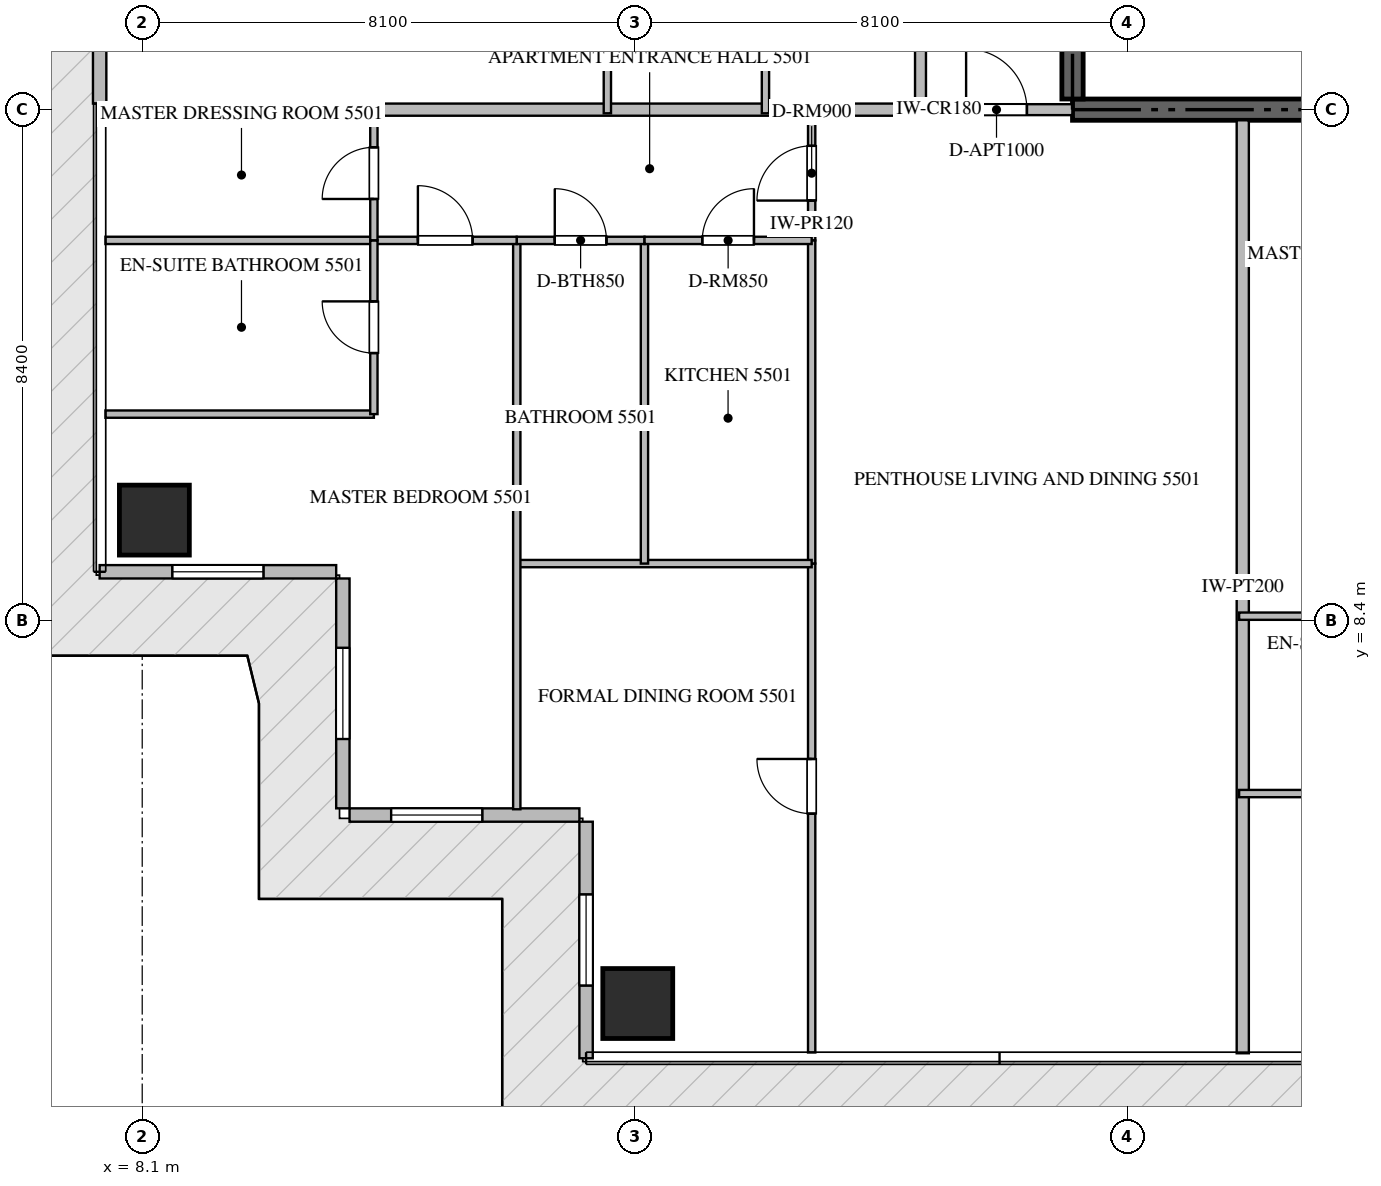
"""IFC4 building model, lengths in metres.
Left out: names, types, materials, properties, quantities, classifications, styles, units other than length and angle.
Written with IfcOpenShell. Run it as: python <this file> out.ifc"""

import sys

from ifc_helpers import new_model, si_unit, direction, frame, frame_2d, origin, origin_2d, place, context, subcontext, project, spatial, rectangle, extrude, source, transform, mapped, element, fill, save


model = new_model("IFC4")
c1 = context("Model", 3, precision=1e-05, world=origin(), true_north=direction((0.0, 1.0)))
c2 = subcontext(c1, "Body", "Model", "MODEL_VIEW")
j1 = project(units=[si_unit("LENGTHUNIT", "METRE"), si_unit("PLANEANGLEUNIT", "RADIAN")], contexts=[c1])
p1 = place(None, origin())
s1 = spatial("IfcSite", under=j1, at=p1, CompositionType="ELEMENT")
p2 = place(p1, origin())
s2 = spatial("IfcBuilding", under=s1, at=p2, CompositionType="ELEMENT")
p3 = place(p2, frame((0.0, 0.0, 222.0)))
s3 = spatial("IfcBuildingStorey", under=s2, at=p3, CompositionType="ELEMENT", Elevation=222.0)
p4 = place(p3, frame((23.4, 16.8, -0.26), z_axis=(0.0, 0.0, 1.0), x_axis=(1.0, 0.0, 0.0)))
e1 = element("IfcWall", 1, at=p4, inside=s3, PredefinedType="SHEAR", context=c2, shape_type="SweptSolid", body=[
    extrude(rectangle(XDim=18.0, YDim=0.35, at=frame_2d((9.0, 0.0))), origin(), (0.0, 0.0, 1.0), 3.848),
])
p5 = place(p3, frame((23.4, 16.975, -0.26), z_axis=(0.0, 0.0, 1.0), x_axis=(0.0, 1.0, 0.0)))
e2 = element("IfcWall", 2, at=p5, inside=s3, PredefinedType="SHEAR", context=c2, shape_type="SweptSolid", body=[
    extrude(rectangle(XDim=4.875, YDim=0.35, at=frame_2d((2.438, 0.0))), origin(), (0.0, 0.0, 1.0), 3.848),
])
m1 = source(origin(), c2, "Body", "SweptSolid", [
    extrude(rectangle(XDim=1.15, YDim=1.15, at=origin_2d()), origin(), (0.0, 0.0, 1.0), 3.85),
])
for number, where, z_axis, x_axis in (
    (3, (16.25, 2.1, -0.26), (0.0, 0.0, 1.0), (1.0, 0.0, 0.0)),
    (4, (8.3, 10.05, -0.26), (0.0, 0.0, 1.0), (1.0, 0.0, 0.0)),
):
    element("IfcColumn", number, at=place(p3, frame(where, z_axis=z_axis, x_axis=x_axis)), inside=s3, PredefinedType="COLUMN", context=c2, shape_type="MappedRepresentation", body=[
        mapped(m1, transform((0.0, 0.0, 0.0), scale=1.0)),
    ])
p6 = place(p3, frame((7.4, 19.9, 0.0), z_axis=(0.0, 0.0, 1.0), x_axis=(0.0, -1.0, 0.0)))
e5 = element("IfcWall", 5, at=p6, inside=s3, PredefinedType="ELEMENTEDWALL", context=c2, shape_type="SweptSolid", body=[
    extrude(rectangle(XDim=3.0, YDim=0.22, at=frame_2d((1.5, 0.0))), origin(), (0.0, 0.0, 1.0), 3.575),
])
p7 = place(p6, frame((0.95, 0.0, 0.0)))
e6 = element("IfcOpeningElement", 6, at=p7, cuts=e5, PredefinedType="OPENING", context=c2, shape_type="SweptSolid", body=[
    extrude(rectangle(XDim=1.1, YDim=2.2, at=frame_2d((0.55, 1.1))), frame((0.0, 0.12, 0.0), z_axis=(0.0, -1.0, 0.0), x_axis=(1.0, 0.0, 0.0)), (0.0, 0.0, 1.0), 0.24),
])
p8 = place(p3, frame((7.4, 9.2, 0.0), z_axis=(0.0, 0.0, 1.0), x_axis=(1.0, 0.0, 0.0)))
e7 = element("IfcWall", 7, at=p8, inside=s3, PredefinedType="ELEMENTEDWALL", context=c2, shape_type="SweptSolid", body=[
    extrude(rectangle(XDim=3.89, YDim=0.22, at=frame_2d((1.945, 0.0))), origin(), (0.0, 0.0, 1.0), 3.575),
])
p9 = place(p8, frame((1.195, 0.0, 0.65)))
e8 = element("IfcOpeningElement", 8, at=p9, cuts=e7, PredefinedType="OPENING", context=c2, shape_type="SweptSolid", body=[
    extrude(rectangle(XDim=1.5, YDim=2.25, at=frame_2d((0.75, 1.125))), frame((0.0, 0.12, 0.0), z_axis=(0.0, -1.0, 0.0), x_axis=(1.0, 0.0, 0.0)), (0.0, 0.0, 1.0), 0.24),
])
p10 = place(p3, frame((11.4, 9.09, 0.0), z_axis=(0.0, 0.0, 1.0), x_axis=(0.0, -1.0, 0.0)))
e9 = element("IfcWall", 9, at=p10, inside=s3, PredefinedType="ELEMENTEDWALL", context=c2, shape_type="SweptSolid", body=[
    extrude(rectangle(XDim=3.78, YDim=0.22, at=frame_2d((1.89, 0.0))), origin(), (0.0, 0.0, 1.0), 3.575),
])
p11 = place(p10, frame((1.14, 0.0, 0.65)))
e10 = element("IfcOpeningElement", 10, at=p11, cuts=e9, PredefinedType="OPENING", context=c2, shape_type="SweptSolid", body=[
    extrude(rectangle(XDim=1.5, YDim=2.25, at=frame_2d((0.75, 1.125))), frame((0.0, 0.12, 0.0), z_axis=(0.0, -1.0, 0.0), x_axis=(1.0, 0.0, 0.0)), (0.0, 0.0, 1.0), 0.24),
])
p12 = place(p3, frame((11.51, 5.2, 0.0), z_axis=(0.0, 0.0, 1.0), x_axis=(1.0, 0.0, 0.0)))
e11 = element("IfcWall", 11, at=p12, inside=s3, PredefinedType="ELEMENTEDWALL", context=c2, shape_type="SweptSolid", body=[
    extrude(rectangle(XDim=3.78, YDim=0.22, at=frame_2d((1.89, 0.0))), origin(), (0.0, 0.0, 1.0), 3.575),
])
p13 = place(p12, frame((0.684, 0.0, 0.65)))
e12 = element("IfcOpeningElement", 12, at=p13, cuts=e11, PredefinedType="OPENING", context=c2, shape_type="SweptSolid", body=[
    extrude(rectangle(XDim=1.5, YDim=2.25, at=frame_2d((0.75, 1.125))), frame((0.0, 0.12, 0.0), z_axis=(0.0, -1.0, 0.0), x_axis=(1.0, 0.0, 0.0)), (0.0, 0.0, 1.0), 0.24),
])
p14 = place(p3, frame((15.4, 5.09, 0.0), z_axis=(0.0, 0.0, 1.0), x_axis=(0.0, -1.0, 0.0)))
e13 = element("IfcWall", 13, at=p14, inside=s3, PredefinedType="ELEMENTEDWALL", context=c2, shape_type="SweptSolid", body=[
    extrude(rectangle(XDim=3.89, YDim=0.22, at=frame_2d((1.945, 0.0))), origin(), (0.0, 0.0, 1.0), 3.575),
])
p15 = place(p14, frame((1.195, 0.0, 0.65)))
e14 = element("IfcOpeningElement", 14, at=p15, cuts=e13, PredefinedType="OPENING", context=c2, shape_type="SweptSolid", body=[
    extrude(rectangle(XDim=1.5, YDim=2.25, at=frame_2d((0.75, 1.125))), frame((0.0, 0.12, 0.0), z_axis=(0.0, -1.0, 0.0), x_axis=(1.0, 0.0, 0.0)), (0.0, 0.0, 1.0), 0.24),
])
p16 = place(p3, frame((26.2, 1.282, 0.0), z_axis=(0.0, 0.0, 1.0), x_axis=(0.0, 1.0, 0.0)))
e15 = element("IfcWall", 15, at=p16, inside=s3, PredefinedType="PARTITIONING", context=c2, shape_type="SweptSolid", body=[
    extrude(rectangle(XDim=15.343, YDim=0.2, at=frame_2d((7.671, 0.0))), origin(), (0.0, 0.0, 1.0), 3.59),
])
p17 = place(p3, frame((7.482, 16.8, 0.0), z_axis=(0.0, 0.0, 1.0), x_axis=(1.0, 0.0, 0.0)))
e16 = element("IfcWall", 16, at=p17, inside=s3, PredefinedType="PARTITIONING", context=c2, shape_type="SweptSolid", body=[
    extrude(rectangle(XDim=13.418, YDim=0.2, at=frame_2d((6.709, 0.0))), origin(), (0.0, 0.0, 1.0), 3.59),
])
p18 = place(p3, frame((20.902, 16.8, 0.0), z_axis=(0.0, 0.0, 1.0), x_axis=(1.0, 0.0, 0.0)))
e17 = element("IfcWall", 17, at=p18, inside=s3, PredefinedType="PARTITIONING", context=c2, shape_type="SweptSolid", body=[
    extrude(rectangle(XDim=2.496, YDim=0.18, at=frame_2d((1.248, 0.0))), origin(), (0.0, 0.0, 1.0), 3.59),
])
p19 = place(p18, frame((0.748, 0.0, 0.0)))
e18 = element("IfcOpeningElement", 18, at=p19, cuts=e17, PredefinedType="OPENING", context=c2, shape_type="SweptSolid", body=[
    extrude(rectangle(XDim=1.0, YDim=2.15, at=frame_2d((0.5, 1.075))), frame((0.0, 0.1, 0.0), z_axis=(0.0, -1.0, 0.0), x_axis=(1.0, 0.0, 0.0)), (0.0, 0.0, 1.0), 0.2),
])
p20 = place(p3, frame((20.9, 16.8, 0.0), z_axis=(0.0, 0.0, 1.0), x_axis=(0.0, 1.0, 0.0)))
e19 = element("IfcWall", 19, at=p20, inside=s3, PredefinedType="PARTITIONING", context=c2, shape_type="SweptSolid", body=[
    extrude(rectangle(XDim=16.8, YDim=0.18, at=frame_2d((8.4, 0.0))), origin(), (0.0, 0.0, 1.0), 3.59),
])
p21 = place(p20, frame((4.503, 0.0, 0.0)))
e20 = element("IfcOpeningElement", 20, at=p21, cuts=e19, PredefinedType="OPENING", context=c2, shape_type="SweptSolid", body=[
    extrude(rectangle(XDim=1.0, YDim=2.15, at=frame_2d((0.5, 1.075))), frame((0.0, 0.1, 0.0), z_axis=(0.0, -1.0, 0.0), x_axis=(1.0, 0.0, 0.0)), (0.0, 0.0, 1.0), 0.2),
])
p22 = place(p20, frame((12.924, 0.0, 0.0)))
e21 = element("IfcOpeningElement", 21, at=p22, cuts=e19, PredefinedType="OPENING", context=c2, shape_type="SweptSolid", body=[
    extrude(rectangle(XDim=1.0, YDim=2.15, at=frame_2d((0.5, 1.075))), frame((0.0, 0.1, 0.0), z_axis=(0.0, -1.0, 0.0), x_axis=(1.0, 0.0, 0.0)), (0.0, 0.0, 1.0), 0.2),
])
p23 = place(p3, frame((19.11, 14.65, 0.0), z_axis=(0.0, 0.0, 1.0), x_axis=(0.0, 1.0, 0.0)))
e22 = element("IfcWall", 22, at=p23, inside=s3, PredefinedType="PARTITIONING", context=c2, shape_type="SweptSolid", body=[
    extrude(rectangle(XDim=2.21, YDim=0.12, at=frame_2d((1.105, 0.0))), origin(), (0.0, 0.0, 1.0), 3.59),
])
p24 = place(p23, frame((0.655, 0.0, 0.0)))
e23 = element("IfcOpeningElement", 23, at=p24, cuts=e22, PredefinedType="OPENING", context=c2, shape_type="SweptSolid", body=[
    extrude(rectangle(XDim=0.9, YDim=2.1, at=frame_2d((0.45, 1.05))), frame((0.0, 0.07, 0.0), z_axis=(0.0, -1.0, 0.0), x_axis=(1.0, 0.0, 0.0)), (0.0, 0.0, 1.0), 0.14),
])
p25 = place(p3, frame((19.11, 1.295, 0.0), z_axis=(0.0, 0.0, 1.0), x_axis=(0.0, 1.0, 0.0)))
e24 = element("IfcWall", 24, at=p25, inside=s3, PredefinedType="PARTITIONING", context=c2, shape_type="SweptSolid", body=[
    extrude(rectangle(XDim=8.04, YDim=0.12, at=frame_2d((4.02, 0.0))), origin(), (0.0, 0.0, 1.0), 3.59),
])
p26 = place(p25, frame((3.927, 0.0, 0.0)))
e25 = element("IfcOpeningElement", 25, at=p26, cuts=e24, PredefinedType="OPENING", context=c2, shape_type="SweptSolid", body=[
    extrude(rectangle(XDim=0.9, YDim=2.1, at=frame_2d((0.45, 1.05))), frame((0.0, 0.07, 0.0), z_axis=(0.0, -1.0, 0.0), x_axis=(1.0, 0.0, 0.0)), (0.0, 0.0, 1.0), 0.14),
])
p27 = place(p3, frame((19.11, 9.337, 0.0), z_axis=(0.0, 0.0, 1.0), x_axis=(0.0, 1.0, 0.0)))
e26 = element("IfcWall", 26, at=p27, inside=s3, PredefinedType="PARTITIONING", context=c2, shape_type="SweptSolid", body=[
    extrude(rectangle(XDim=5.311, YDim=0.12, at=frame_2d((2.656, 0.0))), origin(), (0.0, 0.0, 1.0), 3.59),
])
p28 = place(p3, frame((14.26, 9.335, 0.0), z_axis=(0.0, 0.0, 1.0), x_axis=(1.0, 0.0, 0.0)))
e27 = element("IfcWall", 27, at=p28, inside=s3, PredefinedType="PARTITIONING", context=c2, shape_type="SweptSolid", body=[
    extrude(rectangle(XDim=4.85, YDim=0.12, at=frame_2d((2.425, 0.0))), origin(), (0.0, 0.0, 1.0), 3.59),
])
p29 = place(p3, frame((14.26, 5.295, 0.0), z_axis=(0.0, 0.0, 1.0), x_axis=(0.0, 1.0, 0.0)))
e28 = element("IfcWall", 28, at=p29, inside=s3, PredefinedType="PARTITIONING", context=c2, shape_type="SweptSolid", body=[
    extrude(rectangle(XDim=9.355, YDim=0.12, at=frame_2d((4.677, 0.0))), origin(), (0.0, 0.0, 1.0), 3.59),
])
p30 = place(p3, frame((16.36, 9.335, 0.0), z_axis=(0.0, 0.0, 1.0), x_axis=(0.0, 1.0, 0.0)))
e29 = element("IfcWall", 29, at=p30, inside=s3, PredefinedType="PARTITIONING", context=c2, shape_type="SweptSolid", body=[
    extrude(rectangle(XDim=5.315, YDim=0.12, at=frame_2d((2.657, 0.0))), origin(), (0.0, 0.0, 1.0), 3.122),
])
p31 = place(p3, frame((14.26, 14.65, 0.0), z_axis=(0.0, 0.0, 1.0), x_axis=(1.0, 0.0, 0.0)))
e30 = element("IfcWall", 30, at=p31, inside=s3, PredefinedType="PARTITIONING", context=c2, shape_type="SweptSolid", body=[
    extrude(rectangle(XDim=2.1, YDim=0.12, at=frame_2d((1.05, 0.0))), origin(), (0.0, 0.0, 1.0), 3.59),
])
p32 = place(p31, frame((0.625, 0.0, 0.0)))
e31 = element("IfcOpeningElement", 31, at=p32, cuts=e30, PredefinedType="OPENING", context=c2, shape_type="SweptSolid", body=[
    extrude(rectangle(XDim=0.85, YDim=2.1, at=frame_2d((0.425, 1.05))), frame((0.0, 0.07, 0.0), z_axis=(0.0, -1.0, 0.0), x_axis=(1.0, 0.0, 0.0)), (0.0, 0.0, 1.0), 0.14),
])
p33 = place(p3, frame((16.362, 14.65, 0.0), z_axis=(0.0, 0.0, 1.0), x_axis=(1.0, 0.0, 0.0)))
e32 = element("IfcWall", 32, at=p33, inside=s3, PredefinedType="PARTITIONING", context=c2, shape_type="SweptSolid", body=[
    extrude(rectangle(XDim=2.748, YDim=0.12, at=frame_2d((1.374, 0.0))), origin(), (0.0, 0.0, 1.0), 3.59),
])
p34 = place(p33, frame((0.949, 0.0, 0.0)))
e33 = element("IfcOpeningElement", 33, at=p34, cuts=e32, PredefinedType="OPENING", context=c2, shape_type="SweptSolid", body=[
    extrude(rectangle(XDim=0.85, YDim=2.1, at=frame_2d((0.425, 1.05))), frame((0.0, 0.07, 0.0), z_axis=(0.0, -1.0, 0.0), x_axis=(1.0, 0.0, 0.0)), (0.0, 0.0, 1.0), 0.14),
])
p35 = place(p3, frame((11.91, 14.65, 0.0), z_axis=(0.0, 0.0, 1.0), x_axis=(1.0, 0.0, 0.0)))
e34 = element("IfcWall", 34, at=p35, inside=s3, PredefinedType="PARTITIONING", context=c2, shape_type="SweptSolid", body=[
    extrude(rectangle(XDim=2.348, YDim=0.12, at=frame_2d((1.174, 0.0))), origin(), (0.0, 0.0, 1.0), 3.59),
])
p36 = place(p35, frame((0.724, 0.0, 0.0)))
e35 = element("IfcOpeningElement", 35, at=p36, cuts=e34, PredefinedType="OPENING", context=c2, shape_type="SweptSolid", body=[
    extrude(rectangle(XDim=0.9, YDim=2.1, at=frame_2d((0.45, 1.05))), frame((0.0, 0.07, 0.0), z_axis=(0.0, -1.0, 0.0), x_axis=(1.0, 0.0, 0.0)), (0.0, 0.0, 1.0), 0.14),
])
p37 = place(p3, frame((7.495, 11.793, 0.0), z_axis=(0.0, 0.0, 1.0), x_axis=(1.0, 0.0, 0.0)))
e36 = element("IfcWall", 36, at=p37, inside=s3, PredefinedType="PARTITIONING", context=c2, shape_type="SweptSolid", body=[
    extrude(rectangle(XDim=4.415, YDim=0.12, at=frame_2d((2.208, 0.0))), origin(), (0.0, 0.0, 1.0), 3.59),
])
p38 = place(p3, frame((7.495, 14.65, 0.0), z_axis=(0.0, 0.0, 1.0), x_axis=(1.0, 0.0, 0.0)))
e37 = element("IfcWall", 37, at=p38, inside=s3, PredefinedType="PARTITIONING", context=c2, shape_type="SweptSolid", body=[
    extrude(rectangle(XDim=4.413, YDim=0.12, at=frame_2d((2.207, 0.0))), origin(), (0.0, 0.0, 1.0), 3.59),
])
p39 = place(p3, frame((11.91, 11.793, 0.0), z_axis=(0.0, 0.0, 1.0), x_axis=(0.0, 1.0, 0.0)))
e38 = element("IfcWall", 38, at=p39, inside=s3, PredefinedType="PARTITIONING", context=c2, shape_type="SweptSolid", body=[
    extrude(rectangle(XDim=2.857, YDim=0.12, at=frame_2d((1.428, 0.0))), origin(), (0.0, 0.0, 1.0), 3.59),
])
p40 = place(p39, frame((1.004, 0.0, 0.0)))
e39 = element("IfcOpeningElement", 39, at=p40, cuts=e38, PredefinedType="OPENING", context=c2, shape_type="SweptSolid", body=[
    extrude(rectangle(XDim=0.85, YDim=2.1, at=frame_2d((0.425, 1.05))), frame((0.0, 0.07, 0.0), z_axis=(0.0, -1.0, 0.0), x_axis=(1.0, 0.0, 0.0)), (0.0, 0.0, 1.0), 0.14),
])
p41 = place(p3, frame((11.91, 14.652, 0.0), z_axis=(0.0, 0.0, 1.0), x_axis=(0.0, 1.0, 0.0)))
e40 = element("IfcWall", 40, at=p41, inside=s3, PredefinedType="PARTITIONING", context=c2, shape_type="SweptSolid", body=[
    extrude(rectangle(XDim=2.208, YDim=0.12, at=frame_2d((1.104, 0.0))), origin(), (0.0, 0.0, 1.0), 3.59),
])
p42 = place(p41, frame((0.679, 0.0, 0.0)))
e41 = element("IfcOpeningElement", 41, at=p42, cuts=e40, PredefinedType="OPENING", context=c2, shape_type="SweptSolid", body=[
    extrude(rectangle(XDim=0.85, YDim=2.1, at=frame_2d((0.425, 1.05))), frame((0.0, 0.07, 0.0), z_axis=(0.0, -1.0, 0.0), x_axis=(1.0, 0.0, 0.0)), (0.0, 0.0, 1.0), 0.14),
])
for number, where, z_axis, x_axis in (
    (42, (26.14, 5.553, 0.0), (0.0, 0.0, 1.0), (1.0, 0.0, 0.0)),
    (43, (26.14, 8.47, 0.0), (0.0, 0.0, 1.0), (1.0, 0.0, 0.0)),
):
    element("IfcWall", number, at=place(p3, frame(where, z_axis=z_axis, x_axis=x_axis)), inside=s3, PredefinedType="PARTITIONING", context=c2, shape_type="SweptSolid", body=[
        extrude(rectangle(XDim=4.86, YDim=0.12, at=frame_2d((2.43, 0.0))), origin(), (0.0, 0.0, 1.0), 3.59),
    ])
for number, where, z_axis, x_axis in (
    (44, (18.35, 16.74, 0.0), (0.0, 0.0, 1.0), (0.0, 1.0, 0.0)),
    (45, (15.75, 16.74, 0.0), (0.0, 0.0, 1.0), (0.0, 1.0, 0.0)),
):
    element("IfcWall", number, at=place(p3, frame(where, z_axis=z_axis, x_axis=x_axis)), inside=s3, PredefinedType="PARTITIONING", context=c2, shape_type="SweptSolid", body=[
        extrude(rectangle(XDim=2.66, YDim=0.12, at=frame_2d((1.33, 0.0))), origin(), (0.0, 0.0, 1.0), 3.59),
    ])
m2 = source(origin(), c2, "Body", "SweptSolid", [
    extrude(rectangle(XDim=1.5, YDim=2.25, at=frame_2d((0.75, 1.125))), frame((0.0, 0.03, 0.0), z_axis=(0.0, -1.0, 0.0), x_axis=(1.0, 0.0, 0.0)), (0.0, 0.0, 1.0), 0.06),
])
p43 = place(p9, origin())
e46 = element("IfcWindow", 46, at=p43, inside=s3, PartitioningType="SINGLE_PANEL", PredefinedType="WINDOW", context=c2, shape_type="MappedRepresentation", body=[
    mapped(m2, transform((0.0, 0.0, 0.0), scale=1.0)),
])
fill(e8, e46)
p44 = place(p11, origin())
e47 = element("IfcWindow", 47, at=p44, inside=s3, PartitioningType="SINGLE_PANEL", PredefinedType="WINDOW", context=c2, shape_type="MappedRepresentation", body=[
    mapped(m2, transform((0.0, 0.0, 0.0), scale=1.0)),
])
fill(e10, e47)
p45 = place(p13, origin())
e48 = element("IfcWindow", 48, at=p45, inside=s3, PartitioningType="SINGLE_PANEL", PredefinedType="WINDOW", context=c2, shape_type="MappedRepresentation", body=[
    mapped(m2, transform((0.0, 0.0, 0.0), scale=1.0)),
])
fill(e12, e48)
p46 = place(p15, origin())
e49 = element("IfcWindow", 49, at=p46, inside=s3, PartitioningType="SINGLE_PANEL", PredefinedType="WINDOW", context=c2, shape_type="MappedRepresentation", body=[
    mapped(m2, transform((0.0, 0.0, 0.0), scale=1.0)),
])
fill(e14, e49)
m3 = source(origin(), c2, "Body", "SweptSolid", [
    extrude(rectangle(XDim=1.0, YDim=2.15, at=frame_2d((0.5, 1.075))), frame((0.0, 0.025, 0.0), z_axis=(0.0, -1.0, 0.0), x_axis=(1.0, 0.0, 0.0)), (0.0, 0.0, 1.0), 0.05),
])
p47 = place(p19, origin())
e50 = element("IfcDoor", 50, at=p47, inside=s3, OperationType="SINGLE_SWING_LEFT", PredefinedType="DOOR", context=c2, shape_type="MappedRepresentation", body=[
    mapped(m3, transform((0.0, 0.0, 0.0), scale=1.0)),
])
fill(e18, e50)
m4 = source(origin(), c2, "Body", "SweptSolid", [
    extrude(rectangle(XDim=0.9, YDim=2.1, at=frame_2d((0.45, 1.05))), frame((0.0, 0.025, 0.0), z_axis=(0.0, -1.0, 0.0), x_axis=(1.0, 0.0, 0.0)), (0.0, 0.0, 1.0), 0.05),
])
p48 = place(p24, origin())
e51 = element("IfcDoor", 51, at=p48, inside=s3, OperationType="SINGLE_SWING_LEFT", PredefinedType="DOOR", context=c2, shape_type="MappedRepresentation", body=[
    mapped(m4, transform((0.0, 0.0, 0.0), scale=1.0)),
])
fill(e23, e51)
p49 = place(p26, origin())
e52 = element("IfcDoor", 52, at=p49, inside=s3, OperationType="SINGLE_SWING_RIGHT", PredefinedType="DOOR", context=c2, shape_type="MappedRepresentation", body=[
    mapped(m4, transform((0.0, 0.0, 0.0), scale=1.0)),
])
fill(e25, e52)
m5 = source(origin(), c2, "Body", "SweptSolid", [
    extrude(rectangle(XDim=0.85, YDim=2.1, at=frame_2d((0.425, 1.05))), frame((0.0, 0.025, 0.0), z_axis=(0.0, -1.0, 0.0), x_axis=(1.0, 0.0, 0.0)), (0.0, 0.0, 1.0), 0.05),
])
p50 = place(p32, origin())
e53 = element("IfcDoor", 53, at=p50, inside=s3, OperationType="SINGLE_SWING_LEFT", PredefinedType="DOOR", context=c2, shape_type="MappedRepresentation", body=[
    mapped(m5, transform((0.0, 0.0, 0.0), scale=1.0)),
])
fill(e31, e53)
p51 = place(p34, origin())
e54 = element("IfcDoor", 54, at=p51, inside=s3, OperationType="SINGLE_SWING_RIGHT", PredefinedType="DOOR", context=c2, shape_type="MappedRepresentation", body=[
    mapped(m5, transform((0.0, 0.0, 0.0), scale=1.0)),
])
fill(e33, e54)
p52 = place(p36, origin())
e55 = element("IfcDoor", 55, at=p52, inside=s3, OperationType="SINGLE_SWING_LEFT", PredefinedType="DOOR", context=c2, shape_type="MappedRepresentation", body=[
    mapped(m4, transform((0.0, 0.0, 0.0), scale=1.0)),
])
fill(e35, e55)
p53 = place(p40, origin())
e56 = element("IfcDoor", 56, at=p53, inside=s3, OperationType="SINGLE_SWING_RIGHT", PredefinedType="DOOR", context=c2, shape_type="MappedRepresentation", body=[
    mapped(m5, transform((0.0, 0.0, 0.0), scale=1.0)),
])
fill(e39, e56)
p54 = place(p42, origin())
e57 = element("IfcDoor", 57, at=p54, inside=s3, OperationType="SINGLE_SWING_LEFT", PredefinedType="DOOR", context=c2, shape_type="MappedRepresentation", body=[
    mapped(m5, transform((0.0, 0.0, 0.0), scale=1.0)),
])
fill(e41, e57)
save(model, sys.argv[1])
